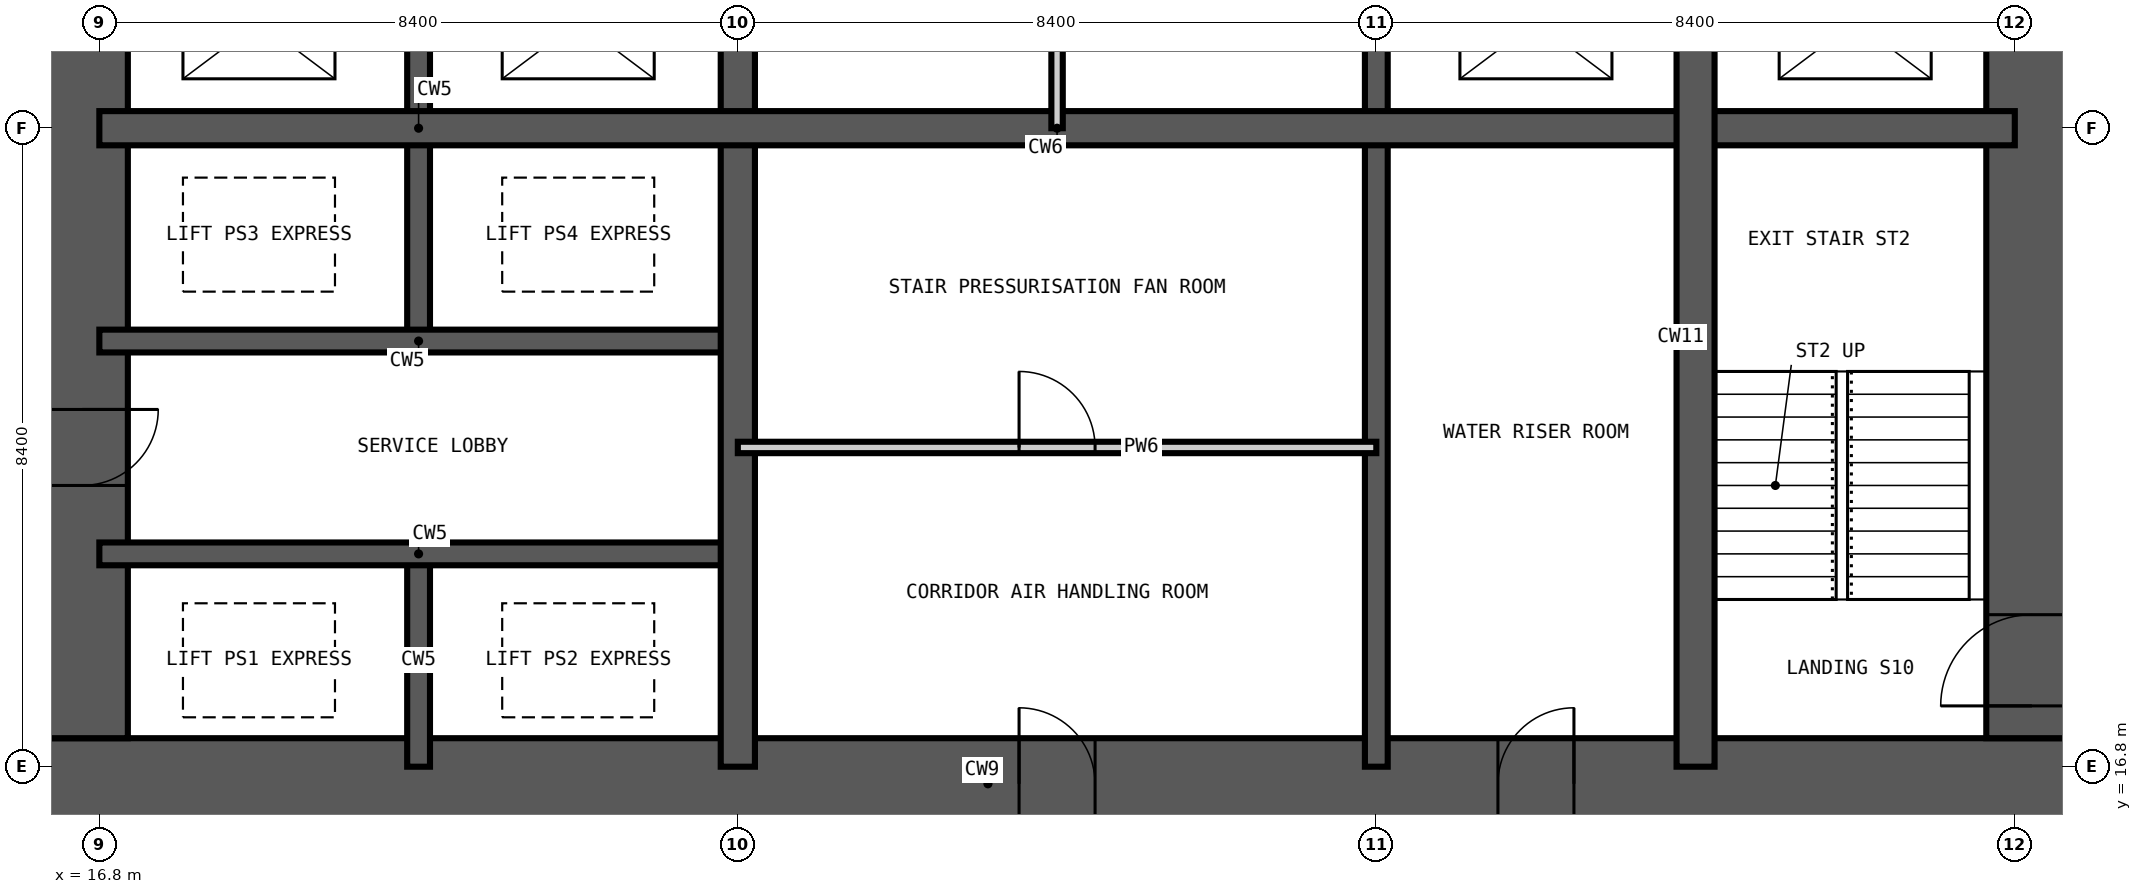
"""IFC4 building model, lengths in metres.
Left out: names, types, materials, properties, quantities, classifications, styles, units other than length and angle.
Written with IfcOpenShell. Run it as: python <this file> out.ifc"""

import sys

from ifc_helpers import new_model, si_unit, direction, frame, frame_2d, origin, place, context, subcontext, project, spatial, rectangle, extrude, element, fill, save


model = new_model("IFC4")
c1 = context("Model", 3, precision=1e-05, world=origin(), true_north=direction((0.0, 1.0)))
c2 = subcontext(c1, "Body", "Model", "MODEL_VIEW")
j1 = project(units=[si_unit("LENGTHUNIT", "METRE"), si_unit("PLANEANGLEUNIT", "RADIAN")], contexts=[c1])
p1 = place(None, origin())
s1 = spatial("IfcSite", under=j1, at=p1, CompositionType="ELEMENT")
p2 = place(p1, origin())
s2 = spatial("IfcBuilding", under=s1, at=p2, CompositionType="ELEMENT")
p3 = place(p2, frame((0.0, 0.0, 111.6)))
s3 = spatial("IfcBuildingStorey", under=s2, at=p3, CompositionType="ELEMENT", Elevation=111.6)
p4 = place(p3, frame((15.975, 16.575, -0.35), z_axis=(0.0, 0.0, 1.0), x_axis=(1.0, 0.0, 0.0)))
e1 = element("IfcWall", 1, at=p4, inside=s3, PredefinedType="SHEAR", context=c2, shape_type="SweptSolid", body=[
    extrude(rectangle(XDim=26.85, YDim=1.2, at=frame_2d((13.425, 0.0))), origin(), (0.0, 0.0, 1.0), 3.6),
])
p5 = place(p4, frame((12.925, 0.0, 0.35)))
e2 = element("IfcOpeningElement", 2, at=p5, cuts=e1, PredefinedType="OPENING", context=c2, shape_type="SweptSolid", body=[
    extrude(rectangle(XDim=1.0, YDim=2.1, at=frame_2d((0.5, 1.05))), frame((0.0, 0.61, 0.0), z_axis=(0.0, -1.0, 0.0), x_axis=(1.0, 0.0, 0.0)), (0.0, 0.0, 1.0), 1.22),
])
p6 = place(p4, frame((19.225, 0.0, 0.35)))
e3 = element("IfcOpeningElement", 3, at=p6, cuts=e1, PredefinedType="OPENING", context=c2, shape_type="SweptSolid", body=[
    extrude(rectangle(XDim=1.0, YDim=2.1, at=frame_2d((0.5, 1.05))), frame((0.0, 0.61, 0.0), z_axis=(0.0, -1.0, 0.0), x_axis=(1.0, 0.0, 0.0)), (0.0, 0.0, 1.0), 1.22),
])
p7 = place(p3, frame((42.225, 17.175, -0.35), z_axis=(0.0, 0.0, 1.0), x_axis=(0.0, 1.0, 0.0)))
e4 = element("IfcWall", 4, at=p7, inside=s3, PredefinedType="SHEAR", context=c2, shape_type="SweptSolid", body=[
    extrude(rectangle(XDim=24.45, YDim=1.2, at=frame_2d((12.225, 0.0))), origin(), (0.0, 0.0, 1.0), 3.6),
])
p8 = place(p7, frame((0.425, 0.0, 0.35)))
e5 = element("IfcOpeningElement", 5, at=p8, cuts=e4, PredefinedType="OPENING", context=c2, shape_type="SweptSolid", body=[
    extrude(rectangle(XDim=1.2, YDim=2.2, at=frame_2d((0.6, 1.1))), frame((0.0, 0.61, 0.0), z_axis=(0.0, -1.0, 0.0), x_axis=(1.0, 0.0, 0.0)), (0.0, 0.0, 1.0), 1.22),
])
p9 = place(p7, frame((11.325, 0.0, 0.35)))
e6 = element("IfcOpeningElement", 6, at=p9, cuts=e4, PredefinedType="OPENING", context=c2, shape_type="SweptSolid", body=[
    extrude(rectangle(XDim=1.8, YDim=2.2, at=frame_2d((0.9, 1.1))), frame((0.0, 0.61, 0.0), z_axis=(0.0, -1.0, 0.0), x_axis=(1.0, 0.0, 0.0)), (0.0, 0.0, 1.0), 1.22),
])
p10 = place(p7, frame((20.125, 0.0, 0.35)))
e7 = element("IfcOpeningElement", 7, at=p10, cuts=e4, PredefinedType="OPENING", context=c2, shape_type="SweptSolid", body=[
    extrude(rectangle(XDim=1.0, YDim=2.1, at=frame_2d((0.5, 1.05))), frame((0.0, 0.61, 0.0), z_axis=(0.0, -1.0, 0.0), x_axis=(1.0, 0.0, 0.0)), (0.0, 0.0, 1.0), 1.22),
])
p11 = place(p3, frame((16.575, 41.625, -0.35), z_axis=(0.0, 0.0, 1.0), x_axis=(0.0, -1.0, 0.0)))
e8 = element("IfcWall", 8, at=p11, inside=s3, PredefinedType="SHEAR", context=c2, shape_type="SweptSolid", body=[
    extrude(rectangle(XDim=24.45, YDim=1.2, at=frame_2d((12.225, 0.0))), origin(), (0.0, 0.0, 1.0), 3.6),
])
p12 = place(p11, frame((11.325, 0.0, 0.35)))
e9 = element("IfcOpeningElement", 9, at=p12, cuts=e8, PredefinedType="OPENING", context=c2, shape_type="SweptSolid", body=[
    extrude(rectangle(XDim=1.8, YDim=2.2, at=frame_2d((0.9, 1.1))), frame((0.0, 0.61, 0.0), z_axis=(0.0, -1.0, 0.0), x_axis=(1.0, 0.0, 0.0)), (0.0, 0.0, 1.0), 1.22),
])
p13 = place(p11, frame((20.125, 0.0, 0.35)))
e10 = element("IfcOpeningElement", 10, at=p13, cuts=e8, PredefinedType="OPENING", context=c2, shape_type="SweptSolid", body=[
    extrude(rectangle(XDim=1.0, YDim=2.1, at=frame_2d((0.5, 1.05))), frame((0.0, 0.61, 0.0), z_axis=(0.0, -1.0, 0.0), x_axis=(1.0, 0.0, 0.0)), (0.0, 0.0, 1.0), 1.22),
])
p14 = place(p11, frame((5.425, 0.0, 0.35)))
e11 = element("IfcOpeningElement", 11, at=p14, cuts=e8, PredefinedType="OPENING", context=c2, shape_type="SweptSolid", body=[
    extrude(rectangle(XDim=1.0, YDim=2.1, at=frame_2d((0.5, 1.05))), frame((0.0, 0.61, 0.0), z_axis=(0.0, -1.0, 0.0), x_axis=(1.0, 0.0, 0.0)), (0.0, 0.0, 1.0), 1.22),
])
p15 = place(p3, frame((21.0, 16.8, -0.35), z_axis=(0.0, 0.0, 1.0), x_axis=(0.0, 1.0, 0.0)))
e12 = element("IfcWall", 12, at=p15, inside=s3, PredefinedType="SHEAR", context=c2, shape_type="SweptSolid", body=[
    extrude(rectangle(XDim=2.8, YDim=0.3, at=frame_2d((1.4, 0.0))), origin(), (0.0, 0.0, 1.0), 3.6),
])
p16 = place(p3, frame((21.0, 22.4, -0.35), z_axis=(0.0, 0.0, 1.0), x_axis=(0.0, 1.0, 0.0)))
e13 = element("IfcWall", 13, at=p16, inside=s3, PredefinedType="SHEAR", context=c2, shape_type="SweptSolid", body=[
    extrude(rectangle(XDim=5.6, YDim=0.3, at=frame_2d((2.8, 0.0))), origin(), (0.0, 0.0, 1.0), 3.6),
])
p17 = place(p3, frame((33.6, 16.8, -0.35), z_axis=(0.0, 0.0, 1.0), x_axis=(0.0, 1.0, 0.0)))
e14 = element("IfcWall", 14, at=p17, inside=s3, PredefinedType="SHEAR", context=c2, shape_type="SweptSolid", body=[
    extrude(rectangle(XDim=25.2, YDim=0.3, at=frame_2d((12.6, 0.0))), origin(), (0.0, 0.0, 1.0), 3.6),
])
p18 = place(p17, frame((22.5, 0.0, 0.35)))
e15 = element("IfcOpeningElement", 15, at=p18, cuts=e14, PredefinedType="OPENING", context=c2, shape_type="SweptSolid", body=[
    extrude(rectangle(XDim=1.2, YDim=2.2, at=frame_2d((0.6, 1.1))), frame((0.0, 0.16, 0.0), z_axis=(0.0, -1.0, 0.0), x_axis=(1.0, 0.0, 0.0)), (0.0, 0.0, 1.0), 0.32),
])
p19 = place(p17, frame((18.3, 0.0, 0.35)))
e16 = element("IfcOpeningElement", 16, at=p19, cuts=e14, PredefinedType="OPENING", context=c2, shape_type="SweptSolid", body=[
    extrude(rectangle(XDim=1.2, YDim=2.2, at=frame_2d((0.6, 1.1))), frame((0.0, 0.16, 0.0), z_axis=(0.0, -1.0, 0.0), x_axis=(1.0, 0.0, 0.0)), (0.0, 0.0, 1.0), 0.32),
])
for number, where, z_axis, x_axis in (
    (17, (16.8, 19.6, -0.35), (0.0, 0.0, 1.0), (1.0, 0.0, 0.0)),
    (18, (16.8, 22.4, -0.35), (0.0, 0.0, 1.0), (1.0, 0.0, 0.0)),
):
    element("IfcWall", number, at=place(p3, frame(where, z_axis=z_axis, x_axis=x_axis)), inside=s3, PredefinedType="SHEAR", context=c2, shape_type="SweptSolid", body=[
        extrude(rectangle(XDim=8.4, YDim=0.3, at=frame_2d((4.2, 0.0))), origin(), (0.0, 0.0, 1.0), 3.6),
    ])
p20 = place(p3, frame((25.2, 16.8, -0.35), z_axis=(0.0, 0.0, 1.0), x_axis=(0.0, 1.0, 0.0)))
e19 = element("IfcWall", 19, at=p20, inside=s3, PredefinedType="SHEAR", context=c2, shape_type="SweptSolid", body=[
    extrude(rectangle(XDim=25.2, YDim=0.45, at=frame_2d((12.6, 0.0))), origin(), (0.0, 0.0, 1.0), 3.6),
])
p21 = place(p20, frame((12.1, 0.0, 0.35)))
e20 = element("IfcOpeningElement", 20, at=p21, cuts=e19, PredefinedType="OPENING", context=c2, shape_type="SweptSolid", body=[
    extrude(rectangle(XDim=1.0, YDim=2.1, at=frame_2d((0.5, 1.05))), frame((0.0, 0.235, 0.0), z_axis=(0.0, -1.0, 0.0), x_axis=(1.0, 0.0, 0.0)), (0.0, 0.0, 1.0), 0.47),
])
p22 = place(p3, frame((16.8, 25.2, -0.35), z_axis=(0.0, 0.0, 1.0), x_axis=(1.0, 0.0, 0.0)))
e21 = element("IfcWall", 21, at=p22, inside=s3, PredefinedType="SHEAR", context=c2, shape_type="SweptSolid", body=[
    extrude(rectangle(XDim=25.2, YDim=0.45, at=frame_2d((12.6, 0.0))), origin(), (0.0, 0.0, 1.0), 3.6),
])
p23 = place(p3, frame((37.8, 16.8, -0.35), z_axis=(0.0, 0.0, 1.0), x_axis=(0.0, 1.0, 0.0)))
e22 = element("IfcWall", 22, at=p23, inside=s3, PredefinedType="SHEAR", context=c2, shape_type="SweptSolid", body=[
    extrude(rectangle(XDim=11.2, YDim=0.5, at=frame_2d((5.6, 0.0))), origin(), (0.0, 0.0, 1.0), 3.6),
])
p24 = place(p3, frame((29.4, 25.2, 0.0), z_axis=(0.0, 0.0, 1.0), x_axis=(0.0, 1.0, 0.0)))
e23 = element("IfcWall", 23, at=p24, inside=s3, PredefinedType="PARTITIONING", context=c2, shape_type="SweptSolid", body=[
    extrude(rectangle(XDim=2.8, YDim=0.15, at=frame_2d((1.4, 0.0))), origin(), (0.0, 0.0, 1.0), 3.25),
])
p25 = place(p3, frame((25.2, 21.0, 0.0), z_axis=(0.0, 0.0, 1.0), x_axis=(1.0, 0.0, 0.0)))
e24 = element("IfcWall", 24, at=p25, inside=s3, PredefinedType="PARTITIONING", context=c2, shape_type="SweptSolid", body=[
    extrude(rectangle(XDim=8.4, YDim=0.15, at=frame_2d((4.2, 0.0))), origin(), (0.0, 0.0, 1.0), 3.25),
])
p26 = place(p25, frame((3.7, 0.0, 0.0)))
e25 = element("IfcOpeningElement", 25, at=p26, cuts=e24, PredefinedType="OPENING", context=c2, shape_type="SweptSolid", body=[
    extrude(rectangle(XDim=1.0, YDim=2.1, at=frame_2d((0.5, 1.05))), frame((0.0, 0.085, 0.0), z_axis=(0.0, -1.0, 0.0), x_axis=(1.0, 0.0, 0.0)), (0.0, 0.0, 1.0), 0.17),
])
p27 = place(p8, origin())
e26 = element("IfcDoor", 26, at=p27, inside=s3, OperationType="SINGLE_SWING_LEFT", PredefinedType="DOOR", context=c2, shape_type="SweptSolid", body=[
    extrude(rectangle(XDim=1.2, YDim=2.2, at=frame_2d((0.6, 1.1))), frame((0.0, 0.025, 0.0), z_axis=(0.0, -1.0, 0.0), x_axis=(1.0, 0.0, 0.0)), (0.0, 0.0, 1.0), 0.05),
])
fill(e5, e26)
p28 = place(p13, origin())
e27 = element("IfcDoor", 27, at=p28, inside=s3, OperationType="SINGLE_SWING_LEFT", PredefinedType="DOOR", context=c2, shape_type="SweptSolid", body=[
    extrude(rectangle(XDim=1.0, YDim=2.1, at=frame_2d((0.5, 1.05))), frame((0.0, 0.025, 0.0), z_axis=(0.0, -1.0, 0.0), x_axis=(1.0, 0.0, 0.0)), (0.0, 0.0, 1.0), 0.05),
])
fill(e10, e27)
p29 = place(p5, origin())
e28 = element("IfcDoor", 28, at=p29, inside=s3, OperationType="SINGLE_SWING_LEFT", PredefinedType="DOOR", context=c2, shape_type="SweptSolid", body=[
    extrude(rectangle(XDim=1.0, YDim=2.1, at=frame_2d((0.5, 1.05))), frame((0.0, 0.025, 0.0), z_axis=(0.0, -1.0, 0.0), x_axis=(1.0, 0.0, 0.0)), (0.0, 0.0, 1.0), 0.05),
])
fill(e2, e28)
p30 = place(p26, origin())
e29 = element("IfcDoor", 29, at=p30, inside=s3, OperationType="SINGLE_SWING_LEFT", PredefinedType="DOOR", context=c2, shape_type="SweptSolid", body=[
    extrude(rectangle(XDim=1.0, YDim=2.1, at=frame_2d((0.5, 1.05))), frame((0.0, 0.025, 0.0), z_axis=(0.0, -1.0, 0.0), x_axis=(1.0, 0.0, 0.0)), (0.0, 0.0, 1.0), 0.05),
])
fill(e25, e29)
p31 = place(p6, origin())
e30 = element("IfcDoor", 30, at=p31, inside=s3, OperationType="SINGLE_SWING_RIGHT", PredefinedType="DOOR", context=c2, shape_type="SweptSolid", body=[
    extrude(rectangle(XDim=1.0, YDim=2.1, at=frame_2d((0.5, 1.05))), frame((0.0, 0.025, 0.0), z_axis=(0.0, -1.0, 0.0), x_axis=(1.0, 0.0, 0.0)), (0.0, 0.0, 1.0), 0.05),
])
fill(e3, e30)
save(model, sys.argv[1])
